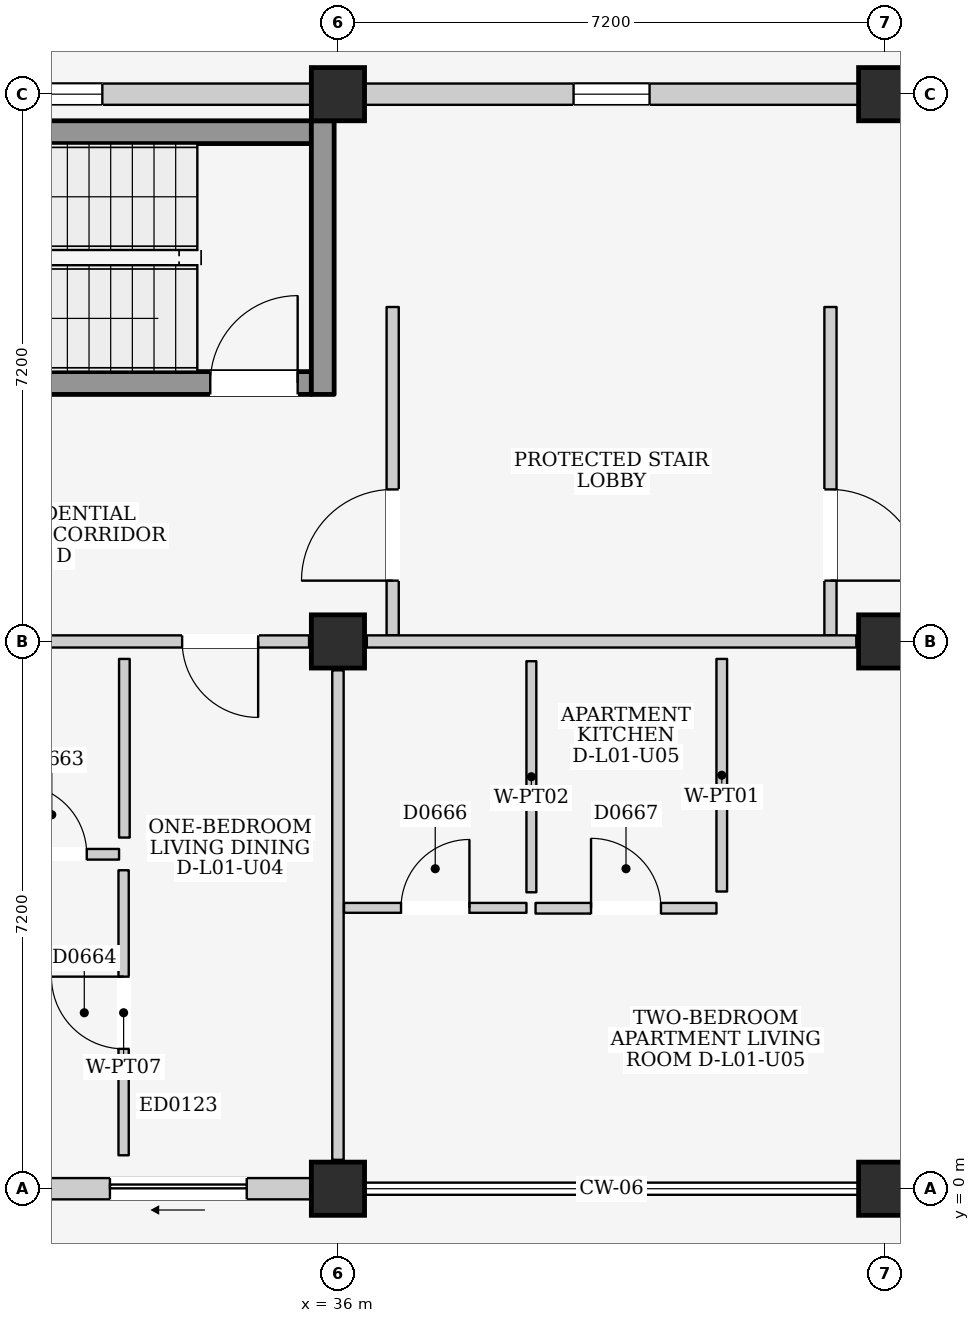
"""IFC4 building model, lengths in metres.
Left out: names, types, materials, properties, quantities, classifications, styles, units other than length and angle.
Written with IfcOpenShell. Run it as: python <this file> out.ifc"""

import sys

from ifc_helpers import new_model, si_unit, direction, frame, frame_2d, origin, origin_2d, place, context, subcontext, project, spatial, rectangle, extrude, element, fill, save


model = new_model("IFC4")
c1 = context("Model", 3, precision=1e-05, world=origin(), true_north=direction((0.0, 1.0)))
c2 = subcontext(c1, "Body", "Model", "MODEL_VIEW")
j1 = project(units=[si_unit("LENGTHUNIT", "METRE"), si_unit("PLANEANGLEUNIT", "RADIAN")], contexts=[c1])
p1 = place(None, origin())
s1 = spatial("IfcSite", under=j1, at=p1, CompositionType="ELEMENT")
p2 = place(p1, origin())
s2 = spatial("IfcBuilding", under=s1, at=p2, CompositionType="ELEMENT")
p3 = place(p2, frame((0.0, 0.0, 4.5)))
s3 = spatial("IfcBuildingStorey", under=s2, at=p3, CompositionType="ELEMENT", Elevation=4.5)
for number, where, z_axis, x_axis in (
    (1, (36.0, 0.0, 0.0), (0.0, 0.0, 1.0), (1.0, 0.0, 0.0)),
    (2, (36.0, 7.2, 0.0), (0.0, 0.0, 1.0), (1.0, 0.0, 0.0)),
    (3, (36.0, 14.4, 0.0), (0.0, 0.0, 1.0), (1.0, 0.0, 0.0)),
    (4, (43.2, 0.0, 0.0), (0.0, 0.0, 1.0), (1.0, 0.0, 0.0)),
    (5, (43.2, 7.2, 0.0), (0.0, 0.0, 1.0), (1.0, 0.0, 0.0)),
    (6, (43.2, 14.4, 0.0), (0.0, 0.0, 1.0), (1.0, 0.0, 0.0)),
):
    element("IfcColumn", number, at=place(p3, frame(where, z_axis=z_axis, x_axis=x_axis)), inside=s3, PredefinedType="COLUMN", context=c2, shape_type="SweptSolid", body=[
        extrude(rectangle(XDim=0.7, YDim=0.7, at=origin_2d()), origin(), (0.0, 0.0, 1.0), 4.5),
    ])
p4 = place(p3, frame((29.15, 0.0, 0.0), z_axis=(0.0, 0.0, 1.0), x_axis=(1.0, 0.0, 0.0)))
e7 = element("IfcWall", 7, at=p4, inside=s3, PredefinedType="ELEMENTEDWALL", context=c2, shape_type="SweptSolid", body=[
    extrude(rectangle(XDim=6.5, YDim=0.28, at=frame_2d((3.25, 0.0))), origin(), (0.0, 0.0, 1.0), 3.715),
])
p5 = place(p4, frame((3.85, 0.0, 0.0)))
e8 = element("IfcOpeningElement", 8, at=p5, cuts=e7, PredefinedType="OPENING", context=c2, shape_type="SweptSolid", body=[
    extrude(rectangle(XDim=1.8, YDim=2.12, at=frame_2d((0.9, 1.06))), frame((0.0, 0.155, 0.0), z_axis=(0.0, -1.0, 0.0), x_axis=(1.0, 0.0, 0.0)), (0.0, 0.0, 1.0), 0.31),
])
p6 = place(p4, frame((0.55, 0.0, 0.9)))
e9 = element("IfcOpeningElement", 9, at=p6, cuts=e7, PredefinedType="OPENING", context=c2, shape_type="SweptSolid", body=[
    extrude(rectangle(XDim=1.35, YDim=1.5, at=frame_2d((0.675, 0.75))), frame((0.0, 0.155, 0.0), z_axis=(0.0, -1.0, 0.0), x_axis=(1.0, 0.0, 0.0)), (0.0, 0.0, 1.0), 0.31),
])
p7 = place(p3, frame((29.15, 14.4, 0.0), z_axis=(0.0, 0.0, 1.0), x_axis=(1.0, 0.0, 0.0)))
e10 = element("IfcWall", 10, at=p7, inside=s3, PredefinedType="ELEMENTEDWALL", context=c2, shape_type="SweptSolid", body=[
    extrude(rectangle(XDim=6.5, YDim=0.28, at=frame_2d((3.25, 0.0))), origin(), (0.0, 0.0, 1.0), 3.635),
])
p8 = place(p7, frame((2.75, 0.0, 1.2)))
e11 = element("IfcOpeningElement", 11, at=p8, cuts=e10, PredefinedType="OPENING", context=c2, shape_type="SweptSolid", body=[
    extrude(rectangle(XDim=1.0, YDim=0.9, at=frame_2d((0.5, 0.45))), frame((0.0, 0.155, 0.0), z_axis=(0.0, -1.0, 0.0), x_axis=(1.0, 0.0, 0.0)), (0.0, 0.0, 1.0), 0.31),
])
p9 = place(p3, frame((36.35, 14.4, 0.0), z_axis=(0.0, 0.0, 1.0), x_axis=(1.0, 0.0, 0.0)))
e12 = element("IfcWall", 12, at=p9, inside=s3, PredefinedType="ELEMENTEDWALL", context=c2, shape_type="SweptSolid", body=[
    extrude(rectangle(XDim=6.5, YDim=0.28, at=frame_2d((3.25, 0.0))), origin(), (0.0, 0.0, 1.0), 3.635),
])
p10 = place(p9, frame((2.75, 0.0, 1.2)))
e13 = element("IfcOpeningElement", 13, at=p10, cuts=e12, PredefinedType="OPENING", context=c2, shape_type="SweptSolid", body=[
    extrude(rectangle(XDim=1.0, YDim=0.9, at=frame_2d((0.5, 0.45))), frame((0.0, 0.155, 0.0), z_axis=(0.0, -1.0, 0.0), x_axis=(1.0, 0.0, 0.0)), (0.0, 0.0, 1.0), 0.31),
])
p11 = place(p3, frame((29.15, 10.6, 0.0), z_axis=(0.0, 0.0, 1.0), x_axis=(1.0, 0.0, 0.0)))
e14 = element("IfcWall", 14, at=p11, inside=s3, PredefinedType="SHEAR", context=c2, shape_type="SweptSolid", body=[
    extrude(rectangle(XDim=6.5, YDim=0.3, at=frame_2d((3.25, 0.0))), origin(), (0.0, 0.0, 1.0), 4.25),
])
p12 = place(p11, frame((5.17, 0.0, 0.0)))
e15 = element("IfcOpeningElement", 15, at=p12, cuts=e14, PredefinedType="OPENING", context=c2, shape_type="SweptSolid", body=[
    extrude(rectangle(XDim=1.15, YDim=2.2, at=frame_2d((0.575, 1.1))), frame((0.0, 0.165, 0.0), z_axis=(0.0, -1.0, 0.0), x_axis=(1.0, 0.0, 0.0)), (0.0, 0.0, 1.0), 0.33),
])
p13 = place(p3, frame((29.15, 13.9, 0.0), z_axis=(0.0, 0.0, 1.0), x_axis=(1.0, 0.0, 0.0)))
e16 = element("IfcWall", 16, at=p13, inside=s3, PredefinedType="SHEAR", context=c2, shape_type="SweptSolid", body=[
    extrude(rectangle(XDim=6.5, YDim=0.3, at=frame_2d((3.25, 0.0))), origin(), (0.0, 0.0, 1.0), 4.25),
])
p14 = place(p3, frame((35.8, 10.45, 0.0), z_axis=(0.0, 0.0, 1.0), x_axis=(0.0, 1.0, 0.0)))
e17 = element("IfcWall", 17, at=p14, inside=s3, PredefinedType="SHEAR", context=c2, shape_type="SweptSolid", body=[
    extrude(rectangle(XDim=3.6, YDim=0.3, at=frame_2d((1.8, 0.0))), origin(), (0.0, 0.0, 1.0), 4.25),
])
p15 = place(p3, frame((36.72, 7.28, 0.0), z_axis=(0.0, 0.0, 1.0), x_axis=(0.0, 1.0, 0.0)))
e18 = element("IfcWall", 18, at=p15, inside=s3, PredefinedType="PARTITIONING", context=c2, shape_type="SweptSolid", body=[
    extrude(rectangle(XDim=4.32, YDim=0.16, at=frame_2d((2.16, 0.0))), origin(), (0.0, 0.0, 1.0), 4.25),
])
p16 = place(p15, frame((0.72, 0.0, 0.0)))
e19 = element("IfcOpeningElement", 19, at=p16, cuts=e18, PredefinedType="OPENING", context=c2, shape_type="SweptSolid", body=[
    extrude(rectangle(XDim=1.2, YDim=2.2, at=frame_2d((0.6, 1.1))), frame((0.0, 0.095, 0.0), z_axis=(0.0, -1.0, 0.0), x_axis=(1.0, 0.0, 0.0)), (0.0, 0.0, 1.0), 0.19),
])
p17 = place(p3, frame((42.48, 7.28, 0.0), z_axis=(0.0, 0.0, 1.0), x_axis=(0.0, 1.0, 0.0)))
e20 = element("IfcWall", 20, at=p17, inside=s3, PredefinedType="PARTITIONING", context=c2, shape_type="SweptSolid", body=[
    extrude(rectangle(XDim=4.32, YDim=0.16, at=frame_2d((2.16, 0.0))), origin(), (0.0, 0.0, 1.0), 4.25),
])
p18 = place(p17, frame((0.72, 0.0, 0.0)))
e21 = element("IfcOpeningElement", 21, at=p18, cuts=e20, PredefinedType="OPENING", context=c2, shape_type="SweptSolid", body=[
    extrude(rectangle(XDim=1.2, YDim=2.2, at=frame_2d((0.6, 1.1))), frame((0.0, 0.095, 0.0), z_axis=(0.0, -1.0, 0.0), x_axis=(1.0, 0.0, 0.0)), (0.0, 0.0, 1.0), 0.19),
])
p19 = place(p3, frame((29.18, 7.2, 0.0), z_axis=(0.0, 0.0, 1.0), x_axis=(1.0, 0.0, 0.0)))
e22 = element("IfcWall", 22, at=p19, inside=s3, PredefinedType="PARTITIONING", context=c2, shape_type="SweptSolid", body=[
    extrude(rectangle(XDim=6.44, YDim=0.16, at=frame_2d((3.22, 0.0))), origin(), (0.0, 0.0, 1.0), 3.635),
])
p20 = place(p19, frame((4.77, 0.0, 0.0)))
e23 = element("IfcOpeningElement", 23, at=p20, cuts=e22, PredefinedType="OPENING", context=c2, shape_type="SweptSolid", body=[
    extrude(rectangle(XDim=1.0, YDim=2.15, at=frame_2d((0.5, 1.075))), frame((0.0, 0.095, 0.0), z_axis=(0.0, -1.0, 0.0), x_axis=(1.0, 0.0, 0.0)), (0.0, 0.0, 1.0), 0.19),
])
p21 = place(p3, frame((36.0, 0.38, 0.0), z_axis=(0.0, 0.0, 1.0), x_axis=(0.0, 1.0, 0.0)))
e24 = element("IfcWall", 24, at=p21, inside=s3, PredefinedType="PARTITIONING", context=c2, shape_type="SweptSolid", body=[
    extrude(rectangle(XDim=6.44, YDim=0.15, at=frame_2d((3.22, 0.0))), origin(), (0.0, 0.0, 1.0), 3.685),
])
p22 = place(p3, frame((31.35, 4.4, 0.0), z_axis=(0.0, 0.0, 1.0), x_axis=(1.0, 0.0, 0.0)))
e25 = element("IfcWall", 25, at=p22, inside=s3, PredefinedType="PARTITIONING", context=c2, shape_type="SweptSolid", body=[
    extrude(rectangle(XDim=1.77, YDim=0.14, at=frame_2d((0.885, 0.0))), origin(), (0.0, 0.0, 1.0), 4.25),
])
p23 = place(p22, frame((0.425, 0.0, 0.0)))
e26 = element("IfcOpeningElement", 26, at=p23, cuts=e25, PredefinedType="OPENING", context=c2, shape_type="SweptSolid", body=[
    extrude(rectangle(XDim=0.92, YDim=2.1, at=frame_2d((0.46, 1.05))), frame((0.0, 0.085, 0.0), z_axis=(0.0, -1.0, 0.0), x_axis=(1.0, 0.0, 0.0)), (0.0, 0.0, 1.0), 0.17),
])
p24 = place(p3, frame((33.19, 4.62, 0.0), z_axis=(0.0, 0.0, 1.0), x_axis=(0.0, 1.0, 0.0)))
e27 = element("IfcWall", 27, at=p24, inside=s3, PredefinedType="PARTITIONING", context=c2, shape_type="SweptSolid", body=[
    extrude(rectangle(XDim=2.35, YDim=0.14, at=frame_2d((1.175, 0.0))), origin(), (0.0, 0.0, 1.0), 4.25),
])
p25 = place(p3, frame((33.18, 0.44, 0.0), z_axis=(0.0, 0.0, 1.0), x_axis=(0.0, 1.0, 0.0)))
e28 = element("IfcWall", 28, at=p25, inside=s3, PredefinedType="PARTITIONING", context=c2, shape_type="SweptSolid", body=[
    extrude(rectangle(XDim=3.75, YDim=0.135, at=frame_2d((1.875, 0.0))), origin(), (0.0, 0.0, 1.0), 4.25),
])
p26 = place(p25, frame((1.4, 0.0, 0.0)))
e29 = element("IfcOpeningElement", 29, at=p26, cuts=e28, PredefinedType="OPENING", context=c2, shape_type="SweptSolid", body=[
    extrude(rectangle(XDim=0.95, YDim=2.15, at=frame_2d((0.475, 1.075))), frame((0.0, 0.083, 0.0), z_axis=(0.0, -1.0, 0.0), x_axis=(1.0, 0.0, 0.0)), (0.0, 0.0, 1.0), 0.165),
])
p27 = place(p3, frame((36.38, 7.2, 0.0), z_axis=(0.0, 0.0, 1.0), x_axis=(1.0, 0.0, 0.0)))
e30 = element("IfcWall", 30, at=p27, inside=s3, PredefinedType="PARTITIONING", context=c2, shape_type="SweptSolid", body=[
    extrude(rectangle(XDim=6.44, YDim=0.16, at=frame_2d((3.22, 0.0))), origin(), (0.0, 0.0, 1.0), 3.635),
])
p28 = place(p3, frame((36.08, 3.695, 0.0), z_axis=(0.0, 0.0, 1.0), x_axis=(1.0, 0.0, 0.0)))
e31 = element("IfcWall", 31, at=p28, inside=s3, PredefinedType="PARTITIONING", context=c2, shape_type="SweptSolid", body=[
    extrude(rectangle(XDim=2.4, YDim=0.13, at=frame_2d((1.2, 0.0))), origin(), (0.0, 0.0, 1.0), 4.25),
])
p29 = place(p28, frame((0.75, 0.0, 0.0)))
e32 = element("IfcOpeningElement", 32, at=p29, cuts=e31, PredefinedType="OPENING", context=c2, shape_type="SweptSolid", body=[
    extrude(rectangle(XDim=0.9, YDim=2.1, at=frame_2d((0.45, 1.05))), frame((0.0, 0.08, 0.0), z_axis=(0.0, -1.0, 0.0), x_axis=(1.0, 0.0, 0.0)), (0.0, 0.0, 1.0), 0.16),
])
p30 = place(p3, frame((38.545, 3.9, 0.0), z_axis=(0.0, 0.0, 1.0), x_axis=(0.0, 1.0, 0.0)))
e33 = element("IfcWall", 33, at=p30, inside=s3, PredefinedType="PARTITIONING", context=c2, shape_type="SweptSolid", body=[
    extrude(rectangle(XDim=3.04, YDim=0.13, at=frame_2d((1.52, 0.0))), origin(), (0.0, 0.0, 1.0), 4.25),
])
p31 = place(p3, frame((38.6, 3.69, 0.0), z_axis=(0.0, 0.0, 1.0), x_axis=(1.0, 0.0, 0.0)))
e34 = element("IfcWall", 34, at=p31, inside=s3, PredefinedType="PARTITIONING", context=c2, shape_type="SweptSolid", body=[
    extrude(rectangle(XDim=2.38, YDim=0.14, at=frame_2d((1.19, 0.0))), origin(), (0.0, 0.0, 1.0), 4.25),
])
p32 = place(p31, frame((0.73, 0.0, 0.0)))
e35 = element("IfcOpeningElement", 35, at=p32, cuts=e34, PredefinedType="OPENING", context=c2, shape_type="SweptSolid", body=[
    extrude(rectangle(XDim=0.92, YDim=2.1, at=frame_2d((0.46, 1.05))), frame((0.0, 0.085, 0.0), z_axis=(0.0, -1.0, 0.0), x_axis=(1.0, 0.0, 0.0)), (0.0, 0.0, 1.0), 0.17),
])
p33 = place(p3, frame((41.05, 3.91, 0.0), z_axis=(0.0, 0.0, 1.0), x_axis=(0.0, 1.0, 0.0)))
e36 = element("IfcWall", 36, at=p33, inside=s3, PredefinedType="PARTITIONING", context=c2, shape_type="SweptSolid", body=[
    extrude(rectangle(XDim=3.06, YDim=0.14, at=frame_2d((1.53, 0.0))), origin(), (0.0, 0.0, 1.0), 4.25),
])
p34 = place(p5, frame((1.8, 0.0, 0.0), z_axis=(0.0, 0.0, 1.0), x_axis=(-1.0, 0.0, 0.0)))
e37 = element("IfcDoor", 37, at=p34, inside=s3, OperationType="SLIDING_TO_LEFT", PredefinedType="DOOR", context=c2, shape_type="SweptSolid", body=[
    extrude(rectangle(XDim=1.8, YDim=2.12, at=frame_2d((0.9, 1.06))), frame((0.0, 0.025, 0.0), z_axis=(0.0, -1.0, 0.0), x_axis=(1.0, 0.0, 0.0)), (0.0, 0.0, 1.0), 0.05),
])
fill(e8, e37)
p35 = place(p8, origin())
e38 = element("IfcWindow", 38, at=p35, inside=s3, PartitioningType="SINGLE_PANEL", PredefinedType="WINDOW", context=c2, shape_type="SweptSolid", body=[
    extrude(rectangle(XDim=1.0, YDim=0.9, at=frame_2d((0.5, 0.45))), frame((0.0, 0.03, 0.0), z_axis=(0.0, -1.0, 0.0), x_axis=(1.0, 0.0, 0.0)), (0.0, 0.0, 1.0), 0.06),
])
fill(e11, e38)
p36 = place(p10, origin())
e39 = element("IfcWindow", 39, at=p36, inside=s3, PartitioningType="SINGLE_PANEL", PredefinedType="WINDOW", context=c2, shape_type="SweptSolid", body=[
    extrude(rectangle(XDim=1.0, YDim=0.9, at=frame_2d((0.5, 0.45))), frame((0.0, 0.03, 0.0), z_axis=(0.0, -1.0, 0.0), x_axis=(1.0, 0.0, 0.0)), (0.0, 0.0, 1.0), 0.06),
])
fill(e13, e39)
p37 = place(p12, origin())
e40 = element("IfcDoor", 40, at=p37, inside=s3, OperationType="SINGLE_SWING_RIGHT", PredefinedType="DOOR", context=c2, shape_type="SweptSolid", body=[
    extrude(rectangle(XDim=1.15, YDim=2.2, at=frame_2d((0.575, 1.1))), frame((0.0, 0.025, 0.0), z_axis=(0.0, -1.0, 0.0), x_axis=(1.0, 0.0, 0.0)), (0.0, 0.0, 1.0), 0.05),
])
fill(e15, e40)
p38 = place(p16, origin())
e41 = element("IfcDoor", 41, at=p38, inside=s3, OperationType="SINGLE_SWING_LEFT", PredefinedType="DOOR", context=c2, shape_type="SweptSolid", body=[
    extrude(rectangle(XDim=1.2, YDim=2.2, at=frame_2d((0.6, 1.1))), frame((0.0, 0.025, 0.0), z_axis=(0.0, -1.0, 0.0), x_axis=(1.0, 0.0, 0.0)), (0.0, 0.0, 1.0), 0.05),
])
fill(e19, e41)
p39 = place(p18, frame((1.2, 0.0, 0.0), z_axis=(0.0, 0.0, 1.0), x_axis=(-1.0, 0.0, 0.0)))
e42 = element("IfcDoor", 42, at=p39, inside=s3, OperationType="SINGLE_SWING_RIGHT", PredefinedType="DOOR", context=c2, shape_type="SweptSolid", body=[
    extrude(rectangle(XDim=1.2, YDim=2.2, at=frame_2d((0.6, 1.1))), frame((0.0, 0.025, 0.0), z_axis=(0.0, -1.0, 0.0), x_axis=(1.0, 0.0, 0.0)), (0.0, 0.0, 1.0), 0.05),
])
fill(e21, e42)
p40 = place(p20, frame((1.0, 0.0, 0.0), z_axis=(0.0, 0.0, 1.0), x_axis=(-1.0, 0.0, 0.0)))
e43 = element("IfcDoor", 43, at=p40, inside=s3, OperationType="SINGLE_SWING_LEFT", PredefinedType="DOOR", context=c2, shape_type="SweptSolid", body=[
    extrude(rectangle(XDim=1.0, YDim=2.15, at=frame_2d((0.5, 1.075))), frame((0.0, 0.025, 0.0), z_axis=(0.0, -1.0, 0.0), x_axis=(1.0, 0.0, 0.0)), (0.0, 0.0, 1.0), 0.05),
])
fill(e23, e43)
p41 = place(p23, origin())
e44 = element("IfcDoor", 44, at=p41, inside=s3, OperationType="SINGLE_SWING_LEFT", PredefinedType="DOOR", context=c2, shape_type="SweptSolid", body=[
    extrude(rectangle(XDim=0.92, YDim=2.1, at=frame_2d((0.46, 1.05))), frame((0.0, 0.025, 0.0), z_axis=(0.0, -1.0, 0.0), x_axis=(1.0, 0.0, 0.0)), (0.0, 0.0, 1.0), 0.05),
])
fill(e26, e44)
p42 = place(p26, origin())
e45 = element("IfcDoor", 45, at=p42, inside=s3, OperationType="SINGLE_SWING_RIGHT", PredefinedType="DOOR", context=c2, shape_type="SweptSolid", body=[
    extrude(rectangle(XDim=0.95, YDim=2.15, at=frame_2d((0.475, 1.075))), frame((0.0, 0.025, 0.0), z_axis=(0.0, -1.0, 0.0), x_axis=(1.0, 0.0, 0.0)), (0.0, 0.0, 1.0), 0.05),
])
fill(e29, e45)
p43 = place(p29, origin())
e46 = element("IfcDoor", 46, at=p43, inside=s3, OperationType="SINGLE_SWING_RIGHT", PredefinedType="DOOR", context=c2, shape_type="SweptSolid", body=[
    extrude(rectangle(XDim=0.9, YDim=2.1, at=frame_2d((0.45, 1.05))), frame((0.0, 0.025, 0.0), z_axis=(0.0, -1.0, 0.0), x_axis=(1.0, 0.0, 0.0)), (0.0, 0.0, 1.0), 0.05),
])
fill(e32, e46)
p44 = place(p32, origin())
e47 = element("IfcDoor", 47, at=p44, inside=s3, OperationType="SINGLE_SWING_LEFT", PredefinedType="DOOR", context=c2, shape_type="SweptSolid", body=[
    extrude(rectangle(XDim=0.92, YDim=2.1, at=frame_2d((0.46, 1.05))), frame((0.0, 0.025, 0.0), z_axis=(0.0, -1.0, 0.0), x_axis=(1.0, 0.0, 0.0)), (0.0, 0.0, 1.0), 0.05),
])
fill(e35, e47)
save(model, sys.argv[1])
